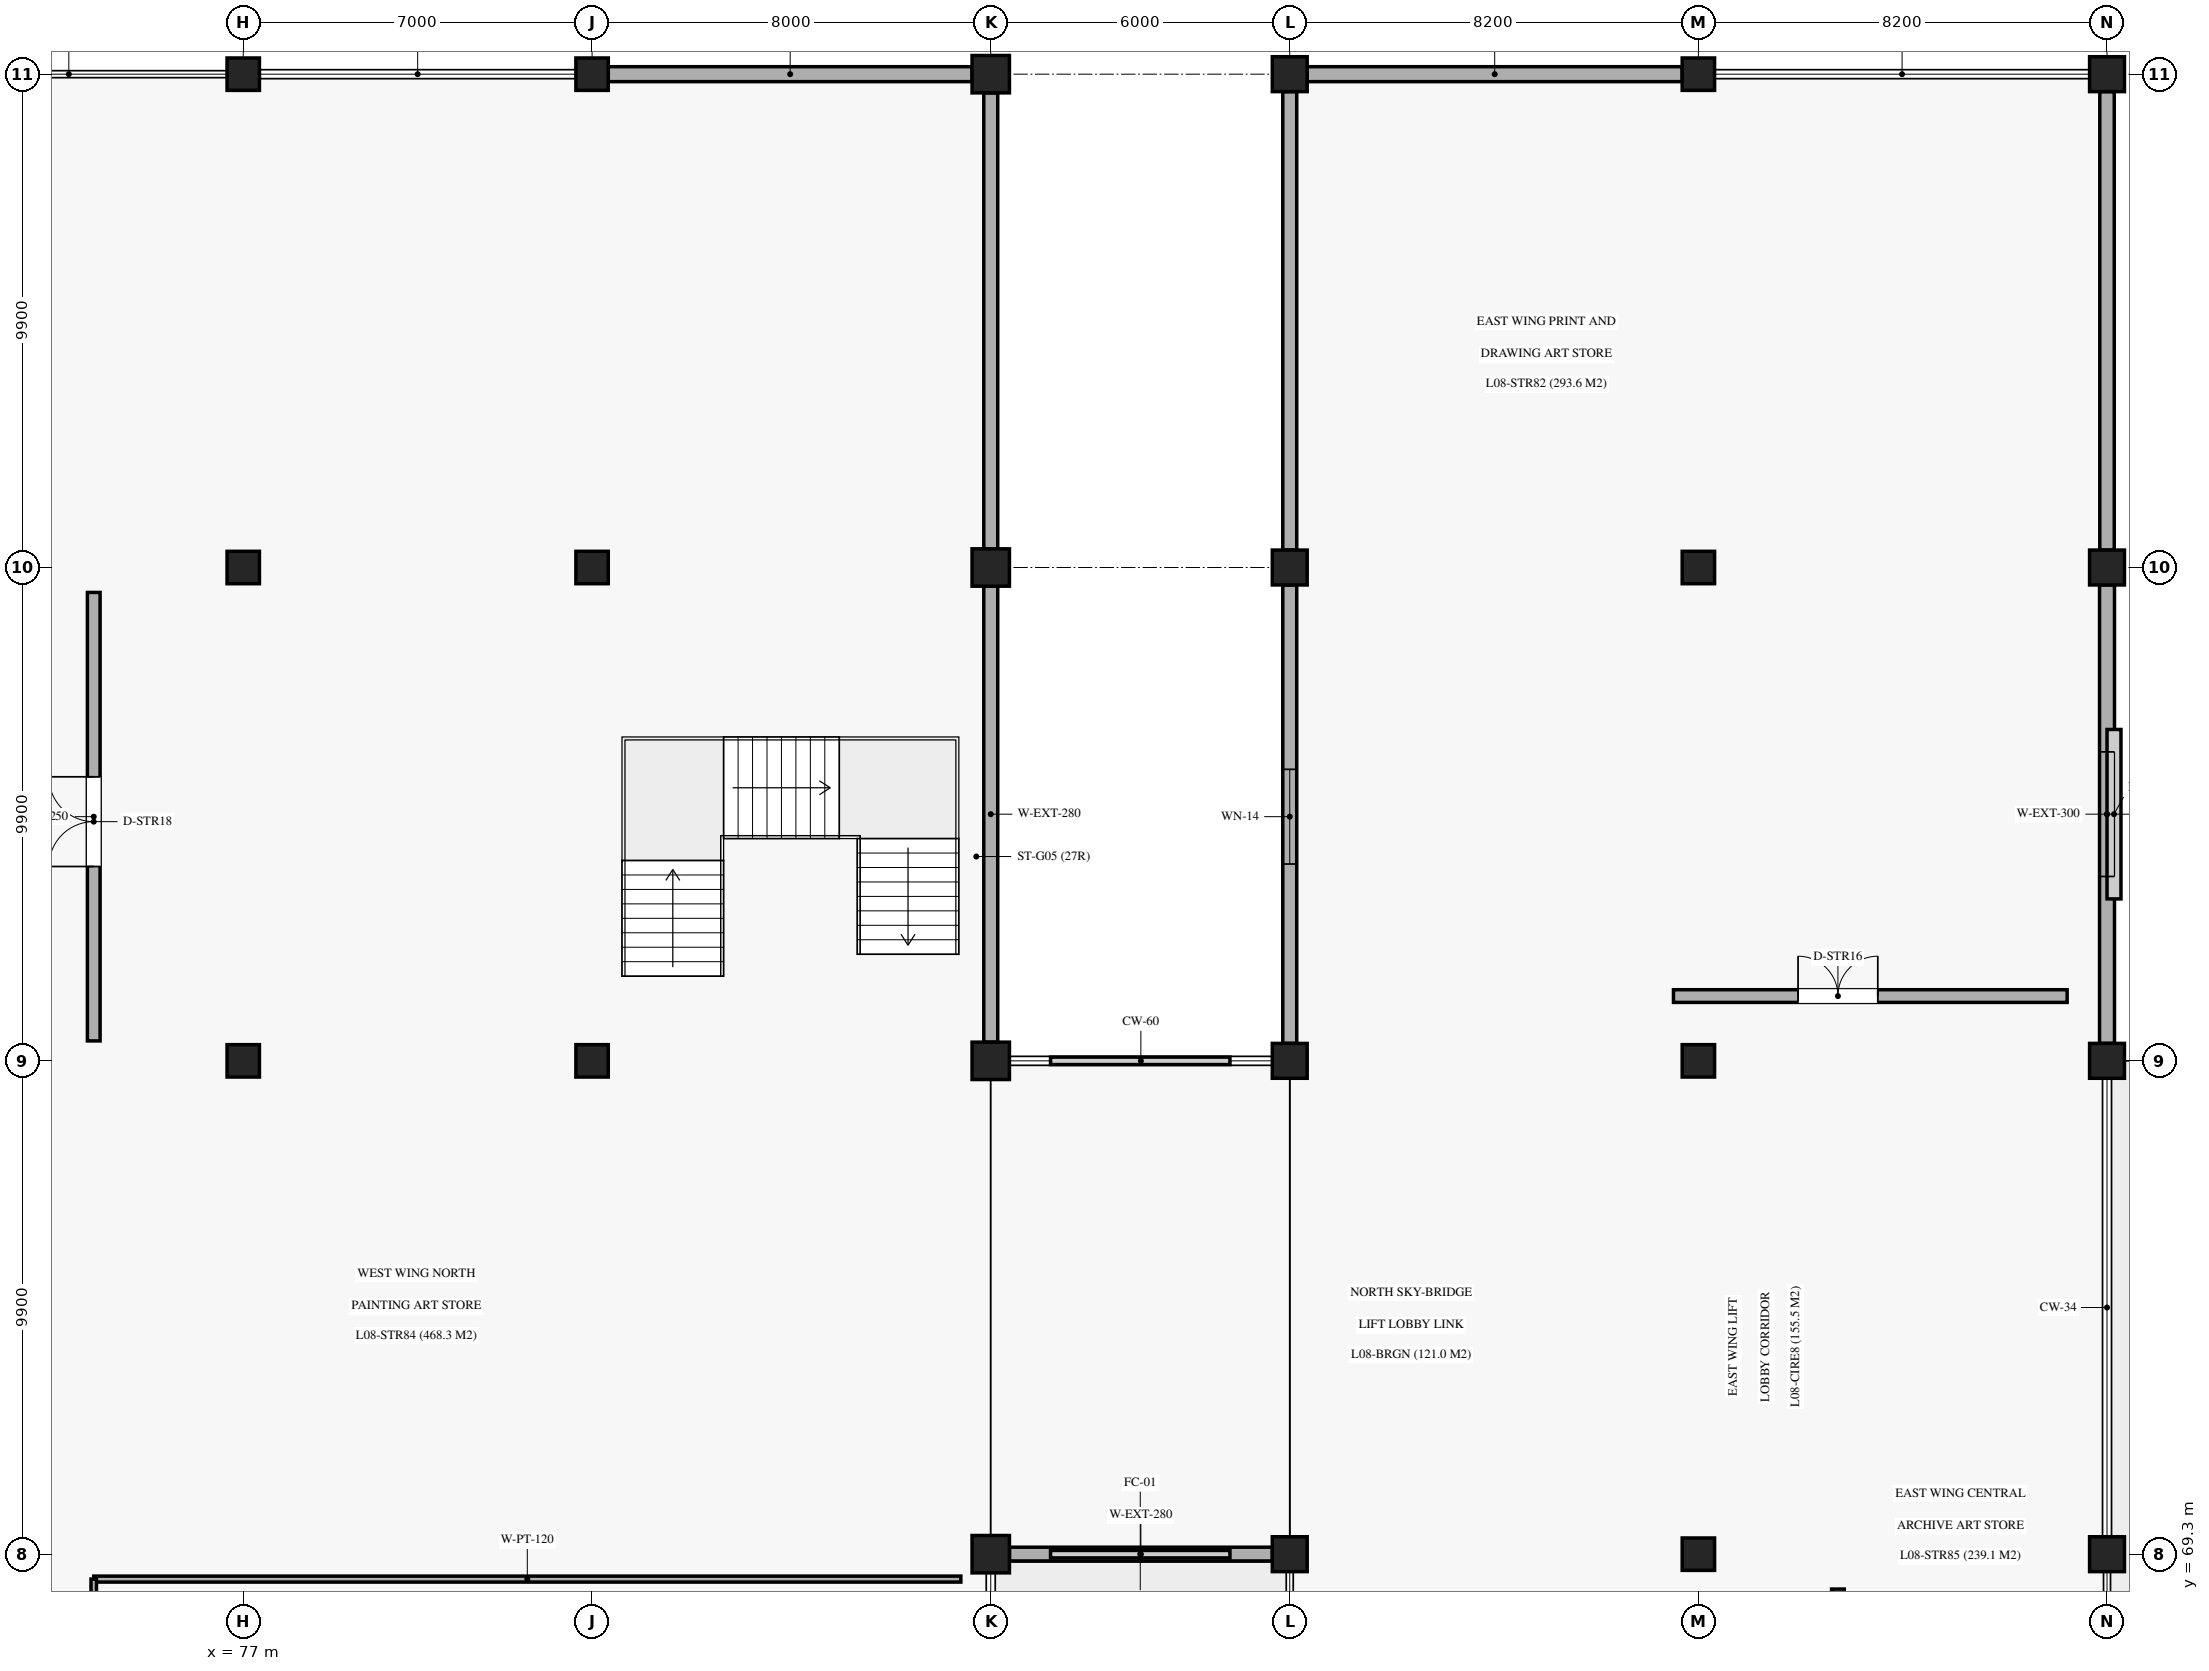
"""IFC4 building model, lengths in metres.
Left out: names, types, materials, properties, quantities, classifications, styles, units other than length and angle.
Written with IfcOpenShell. Run it as: python <this file> out.ifc"""

import sys

from ifc_helpers import new_model, si_unit, direction, frame, frame_2d, origin, origin_2d, place, context, subcontext, project, spatial, rectangle, extrude, element, fill, save


model = new_model("IFC4")
c1 = context("Model", 3, precision=1e-05, world=origin(), true_north=direction((0.0, 1.0)))
c2 = subcontext(c1, "Body", "Model", "MODEL_VIEW")
j1 = project(units=[si_unit("LENGTHUNIT", "METRE"), si_unit("PLANEANGLEUNIT", "RADIAN")], contexts=[c1])
p1 = place(None, origin())
s1 = spatial("IfcSite", under=j1, at=p1, CompositionType="ELEMENT")
p2 = place(p1, origin())
s2 = spatial("IfcBuilding", under=s1, at=p2, CompositionType="ELEMENT")
p3 = place(p2, frame((0.0, 0.0, 42.33)))
s3 = spatial("IfcBuildingStorey", under=s2, at=p3, CompositionType="ELEMENT", Elevation=42.33)
for number, where, z_axis, x_axis in (
    (1, (77.0, 79.2, 0.0), (0.0, 0.0, 1.0), (1.0, 0.0, 0.0)),
    (2, (77.0, 89.1, 0.0), (0.0, 0.0, 1.0), (1.0, 0.0, 0.0)),
    (3, (77.0, 99.0, 0.0), (0.0, 0.0, 1.0), (1.0, 0.0, 0.0)),
    (4, (84.0, 79.2, 0.0), (0.0, 0.0, 1.0), (1.0, 0.0, 0.0)),
    (5, (84.0, 89.1, 0.0), (0.0, 0.0, 1.0), (1.0, 0.0, 0.0)),
    (6, (84.0, 99.0, 0.0), (0.0, 0.0, 1.0), (1.0, 0.0, 0.0)),
):
    element("IfcColumn", number, at=place(p3, frame(where, z_axis=z_axis, x_axis=x_axis)), inside=s3, PredefinedType="COLUMN", context=c2, shape_type="SweptSolid", body=[
        extrude(rectangle(XDim=0.65, YDim=0.65, at=origin_2d()), origin(), (0.0, 0.0, 1.0), 4.59),
    ])
for number, where, z_axis, x_axis in (
    (7, (92.0, 69.3, 0.0), (0.0, 0.0, 1.0), (1.0, 0.0, 0.0)),
    (8, (92.0, 79.2, 0.0), (0.0, 0.0, 1.0), (1.0, 0.0, 0.0)),
    (9, (92.0, 89.1, 0.0), (0.0, 0.0, 1.0), (1.0, 0.0, 0.0)),
    (10, (92.0, 99.0, 0.0), (0.0, 0.0, 1.0), (1.0, 0.0, 0.0)),
):
    element("IfcColumn", number, at=place(p3, frame(where, z_axis=z_axis, x_axis=x_axis)), inside=s3, PredefinedType="COLUMN", context=c2, shape_type="SweptSolid", body=[
        extrude(rectangle(XDim=0.75, YDim=0.75, at=origin_2d()), origin(), (0.0, 0.0, 1.0), 4.59),
    ])
for number, where, z_axis, x_axis in (
    (11, (98.0, 69.3, 0.0), (0.0, 0.0, 1.0), (1.0, 0.0, 0.0)),
    (12, (98.0, 79.2, 0.0), (0.0, 0.0, 1.0), (1.0, 0.0, 0.0)),
    (13, (98.0, 89.1, 0.0), (0.0, 0.0, 1.0), (1.0, 0.0, 0.0)),
    (14, (98.0, 99.0, 0.0), (0.0, 0.0, 1.0), (1.0, 0.0, 0.0)),
):
    element("IfcColumn", number, at=place(p3, frame(where, z_axis=z_axis, x_axis=x_axis)), inside=s3, PredefinedType="COLUMN", context=c2, shape_type="SweptSolid", body=[
        extrude(rectangle(XDim=0.7, YDim=0.7, at=origin_2d()), origin(), (0.0, 0.0, 1.0), 4.59),
    ])
for number, where, z_axis, x_axis in (
    (15, (106.2, 69.3, 0.0), (0.0, 0.0, 1.0), (1.0, 0.0, 0.0)),
    (16, (106.2, 79.2, 0.0), (0.0, 0.0, 1.0), (1.0, 0.0, 0.0)),
    (17, (106.2, 89.1, 0.0), (0.0, 0.0, 1.0), (1.0, 0.0, 0.0)),
    (18, (106.2, 99.0, 0.0), (0.0, 0.0, 1.0), (1.0, 0.0, 0.0)),
):
    element("IfcColumn", number, at=place(p3, frame(where, z_axis=z_axis, x_axis=x_axis)), inside=s3, PredefinedType="COLUMN", context=c2, shape_type="SweptSolid", body=[
        extrude(rectangle(XDim=0.65, YDim=0.65, at=origin_2d()), origin(), (0.0, 0.0, 1.0), 4.59),
    ])
for number, where, z_axis, x_axis in (
    (19, (114.4, 69.3, 0.0), (0.0, 0.0, 1.0), (1.0, 0.0, 0.0)),
    (20, (114.4, 79.2, 0.0), (0.0, 0.0, 1.0), (1.0, 0.0, 0.0)),
    (21, (114.4, 89.1, 0.0), (0.0, 0.0, 1.0), (1.0, 0.0, 0.0)),
    (22, (114.4, 99.0, 0.0), (0.0, 0.0, 1.0), (1.0, 0.0, 0.0)),
):
    element("IfcColumn", number, at=place(p3, frame(where, z_axis=z_axis, x_axis=x_axis)), inside=s3, PredefinedType="COLUMN", context=c2, shape_type="SweptSolid", body=[
        extrude(rectangle(XDim=0.7, YDim=0.7, at=origin_2d()), origin(), (0.0, 0.0, 1.0), 4.59),
    ])
p4 = place(p3, frame((92.0, 79.575, 0.0), z_axis=(0.0, 0.0, 1.0), x_axis=(0.0, 1.0, 0.0)))
e23 = element("IfcWall", 23, at=p4, inside=s3, PredefinedType="SOLIDWALL", context=c2, shape_type="SweptSolid", body=[
    extrude(rectangle(XDim=9.15, YDim=0.28, at=frame_2d((4.575, 0.0))), origin(), (0.0, 0.0, 1.0), 3.59),
])
p5 = place(p3, frame((92.0, 89.475, 0.0), z_axis=(0.0, 0.0, 1.0), x_axis=(0.0, 1.0, 0.0)))
e24 = element("IfcWall", 24, at=p5, inside=s3, PredefinedType="SOLIDWALL", context=c2, shape_type="SweptSolid", body=[
    extrude(rectangle(XDim=9.15, YDim=0.28, at=frame_2d((4.575, 0.0))), origin(), (0.0, 0.0, 1.0), 3.59),
])
p6 = place(p3, frame((84.325, 99.0, 0.0), z_axis=(0.0, 0.0, 1.0), x_axis=(1.0, 0.0, 0.0)))
e25 = element("IfcWall", 25, at=p6, inside=s3, PredefinedType="SOLIDWALL", context=c2, shape_type="SweptSolid", body=[
    extrude(rectangle(XDim=7.3, YDim=0.3, at=frame_2d((3.65, 0.0))), origin(), (0.0, 0.0, 1.0), 3.59),
])
p7 = place(p3, frame((98.0, 79.55, 0.0), z_axis=(0.0, 0.0, 1.0), x_axis=(0.0, 1.0, 0.0)))
e26 = element("IfcWall", 26, at=p7, inside=s3, PredefinedType="SOLIDWALL", context=c2, shape_type="SweptSolid", body=[
    extrude(rectangle(XDim=9.2, YDim=0.28, at=frame_2d((4.6, 0.0))), origin(), (0.0, 0.0, 1.0), 3.59),
])
p8 = place(p7, frame((3.6, 0.0, 1.45)))
e27 = element("IfcOpeningElement", 27, at=p8, cuts=e26, PredefinedType="OPENING", context=c2, shape_type="SweptSolid", body=[
    extrude(rectangle(XDim=1.9, YDim=1.45, at=frame_2d((0.95, 0.725))), frame((0.0, 0.15, 0.0), z_axis=(0.0, -1.0, 0.0), x_axis=(1.0, 0.0, 0.0)), (0.0, 0.0, 1.0), 0.3),
])
p9 = place(p3, frame((114.4, 79.55, 0.0), z_axis=(0.0, 0.0, 1.0), x_axis=(0.0, 1.0, 0.0)))
e28 = element("IfcWall", 28, at=p9, inside=s3, PredefinedType="SOLIDWALL", context=c2, shape_type="SweptSolid", body=[
    extrude(rectangle(XDim=9.2, YDim=0.3, at=frame_2d((4.6, 0.0))), origin(), (0.0, 0.0, 1.0), 3.59),
])
p10 = place(p9, frame((3.35, 0.0, 1.65)))
e29 = element("IfcOpeningElement", 29, at=p10, cuts=e28, PredefinedType="OPENING", context=c2, shape_type="SweptSolid", body=[
    extrude(rectangle(XDim=2.5, YDim=1.6, at=frame_2d((1.25, 0.8))), frame((0.0, 0.16, 0.0), z_axis=(0.0, -1.0, 0.0), x_axis=(1.0, 0.0, 0.0)), (0.0, 0.0, 1.0), 0.32),
])
p11 = place(p3, frame((98.0, 89.45, 0.0), z_axis=(0.0, 0.0, 1.0), x_axis=(0.0, 1.0, 0.0)))
e30 = element("IfcWall", 30, at=p11, inside=s3, PredefinedType="SOLIDWALL", context=c2, shape_type="SweptSolid", body=[
    extrude(rectangle(XDim=9.2, YDim=0.28, at=frame_2d((4.6, 0.0))), origin(), (0.0, 0.0, 1.0), 3.59),
])
p12 = place(p3, frame((114.4, 89.45, 0.0), z_axis=(0.0, 0.0, 1.0), x_axis=(0.0, 1.0, 0.0)))
e31 = element("IfcWall", 31, at=p12, inside=s3, PredefinedType="SOLIDWALL", context=c2, shape_type="SweptSolid", body=[
    extrude(rectangle(XDim=9.2, YDim=0.29, at=frame_2d((4.6, 0.0))), origin(), (0.0, 0.0, 1.0), 3.59),
])
p13 = place(p3, frame((98.35, 99.0, 0.0), z_axis=(0.0, 0.0, 1.0), x_axis=(1.0, 0.0, 0.0)))
e32 = element("IfcWall", 32, at=p13, inside=s3, PredefinedType="SOLIDWALL", context=c2, shape_type="SweptSolid", body=[
    extrude(rectangle(XDim=7.525, YDim=0.3, at=frame_2d((3.762, 0.0))), origin(), (0.0, 0.0, 1.0), 3.59),
])
p14 = place(p3, frame((92.375, 69.3, 0.0), z_axis=(0.0, 0.0, 1.0), x_axis=(1.0, 0.0, 0.0)))
e33 = element("IfcWall", 33, at=p14, inside=s3, PredefinedType="SOLIDWALL", context=c2, shape_type="SweptSolid", body=[
    extrude(rectangle(XDim=5.275, YDim=0.28, at=frame_2d((2.637, 0.0))), origin(), (0.0, 0.0, 1.0), 3.59),
])
p15 = place(p3, frame((74.0, 68.8, 0.0), z_axis=(0.0, 0.0, 1.0), x_axis=(1.0, 0.0, 0.0)))
e34 = element("IfcWall", 34, at=p15, inside=s3, PredefinedType="PARTITIONING", context=c2, shape_type="SweptSolid", body=[
    extrude(rectangle(XDim=17.4, YDim=0.12, at=frame_2d((8.7, 0.0))), origin(), (0.0, 0.0, 1.0), 3.46),
])
p16 = place(p3, frame((74.0, 50.0, 0.0), z_axis=(0.0, 0.0, 1.0), x_axis=(0.0, 1.0, 0.0)))
e35 = element("IfcWall", 35, at=p16, inside=s3, PredefinedType="PARTITIONING", context=c2, shape_type="SweptSolid", body=[
    extrude(rectangle(XDim=18.8, YDim=0.11, at=frame_2d((9.4, 0.0))), origin(), (0.0, 0.0, 1.0), 3.46),
])
p17 = place(p16, frame((8.0, 0.0, 0.0)))
e36 = element("IfcOpeningElement", 36, at=p17, cuts=e35, PredefinedType="OPENING", context=c2, shape_type="SweptSolid", body=[
    extrude(rectangle(XDim=1.8, YDim=2.45, at=frame_2d((0.9, 1.225))), frame((0.0, 0.065, 0.0), z_axis=(0.0, -1.0, 0.0), x_axis=(1.0, 0.0, 0.0)), (0.0, 0.0, 1.0), 0.13),
])
p18 = place(p3, frame((74.0, 79.6, 0.0), z_axis=(0.0, 0.0, 1.0), x_axis=(0.0, 1.0, 0.0)))
e37 = element("IfcWall", 37, at=p18, inside=s3, PredefinedType="SOLIDWALL", context=c2, shape_type="SweptSolid", body=[
    extrude(rectangle(XDim=9.0, YDim=0.255, at=frame_2d((4.5, 0.0))), origin(), (0.0, 0.0, 1.0), 3.46),
])
p19 = place(p18, frame((3.5, 0.0, 0.0)))
e38 = element("IfcOpeningElement", 38, at=p19, cuts=e37, PredefinedType="OPENING", context=c2, shape_type="SweptSolid", body=[
    extrude(rectangle(XDim=1.8, YDim=2.35, at=frame_2d((0.9, 1.175))), frame((0.0, 0.137, 0.0), z_axis=(0.0, -1.0, 0.0), x_axis=(1.0, 0.0, 0.0)), (0.0, 0.0, 1.0), 0.275),
])
p20 = place(p3, frame((105.7, 80.5, 0.0), z_axis=(0.0, 0.0, 1.0), x_axis=(1.0, 0.0, 0.0)))
e39 = element("IfcWall", 39, at=p20, inside=s3, PredefinedType="SOLIDWALL", context=c2, shape_type="SweptSolid", body=[
    extrude(rectangle(XDim=7.9, YDim=0.255, at=frame_2d((3.95, 0.0))), origin(), (0.0, 0.0, 1.0), 3.46),
])
p21 = place(p20, frame((2.5, 0.0, 0.0)))
e40 = element("IfcOpeningElement", 40, at=p21, cuts=e39, PredefinedType="OPENING", context=c2, shape_type="SweptSolid", body=[
    extrude(rectangle(XDim=1.6, YDim=2.3, at=frame_2d((0.8, 1.15))), frame((0.0, 0.137, 0.0), z_axis=(0.0, -1.0, 0.0), x_axis=(1.0, 0.0, 0.0)), (0.0, 0.0, 1.0), 0.275),
])
p22 = place(p3, frame((109.0, 50.2, 0.0), z_axis=(0.0, 0.0, 1.0), x_axis=(0.0, 1.0, 0.0)))
e41 = element("IfcWall", 41, at=p22, inside=s3, PredefinedType="SOLIDWALL", context=c2, shape_type="SweptSolid", body=[
    extrude(rectangle(XDim=18.4, YDim=0.255, at=frame_2d((9.2, 0.0))), origin(), (0.0, 0.0, 1.0), 3.46),
])
p23 = place(p22, frame((8.0, 0.0, 0.0)))
e42 = element("IfcOpeningElement", 42, at=p23, cuts=e41, PredefinedType="OPENING", context=c2, shape_type="SweptSolid", body=[
    extrude(rectangle(XDim=1.6, YDim=2.3, at=frame_2d((0.8, 1.15))), frame((0.0, 0.137, 0.0), z_axis=(0.0, -1.0, 0.0), x_axis=(1.0, 0.0, 0.0)), (0.0, 0.0, 1.0), 0.275),
])
p24 = place(p8, origin())
e43 = element("IfcWindow", 43, at=p24, inside=s3, PartitioningType="SINGLE_PANEL", PredefinedType="WINDOW", context=c2, shape_type="SweptSolid", body=[
    extrude(rectangle(XDim=1.9, YDim=1.45, at=frame_2d((0.95, 0.725))), frame((0.0, 0.03, 0.0), z_axis=(0.0, -1.0, 0.0), x_axis=(1.0, 0.0, 0.0)), (0.0, 0.0, 1.0), 0.06),
])
fill(e27, e43)
p25 = place(p10, origin())
e44 = element("IfcWindow", 44, at=p25, inside=s3, PartitioningType="SINGLE_PANEL", PredefinedType="WINDOW", context=c2, shape_type="SweptSolid", body=[
    extrude(rectangle(XDim=2.5, YDim=1.6, at=frame_2d((1.25, 0.8))), frame((0.0, 0.03, 0.0), z_axis=(0.0, -1.0, 0.0), x_axis=(1.0, 0.0, 0.0)), (0.0, 0.0, 1.0), 0.06),
])
fill(e29, e44)
p26 = place(p19, origin())
e45 = element("IfcDoor", 45, at=p26, inside=s3, OperationType="DOUBLE_DOOR_SINGLE_SWING", PredefinedType="DOOR", context=c2, shape_type="SweptSolid", body=[
    extrude(rectangle(XDim=1.8, YDim=2.35, at=frame_2d((0.9, 1.175))), frame((0.0, 0.025, 0.0), z_axis=(0.0, -1.0, 0.0), x_axis=(1.0, 0.0, 0.0)), (0.0, 0.0, 1.0), 0.05),
])
fill(e38, e45)
p27 = place(p21, origin())
e46 = element("IfcDoor", 46, at=p27, inside=s3, OperationType="DOUBLE_DOOR_SINGLE_SWING", PredefinedType="DOOR", context=c2, shape_type="SweptSolid", body=[
    extrude(rectangle(XDim=1.6, YDim=2.3, at=frame_2d((0.8, 1.15))), frame((0.0, 0.025, 0.0), z_axis=(0.0, -1.0, 0.0), x_axis=(1.0, 0.0, 0.0)), (0.0, 0.0, 1.0), 0.05),
])
fill(e40, e46)
save(model, sys.argv[1])
